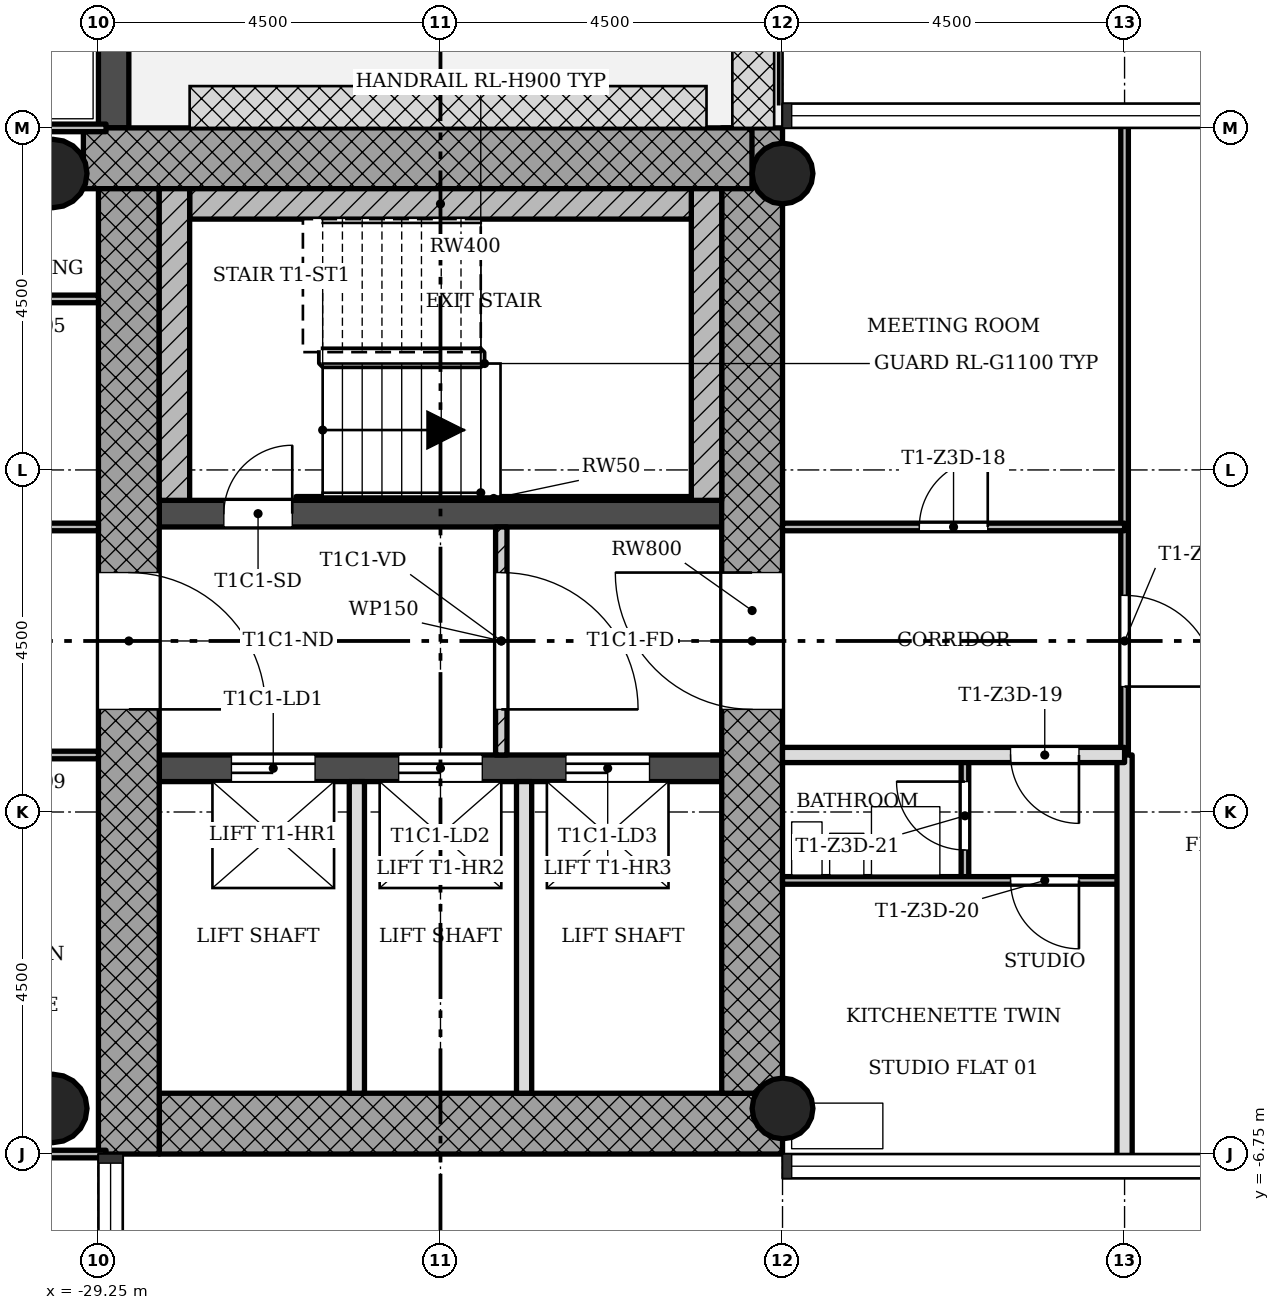
"""IFC4 building model, lengths in metres.
Left out: names, types, materials, properties, quantities, classifications, styles, units other than length and angle.
Written with IfcOpenShell. Run it as: python <this file> out.ifc"""

import sys

from ifc_helpers import new_model, si_unit, direction, frame, frame_2d, origin, origin_2d, place, context, subcontext, project, spatial, rectangle, hollow_circle, extrude, element, fill, save


model = new_model("IFC4")
c1 = context("Model", 3, precision=1e-05, world=origin(), true_north=direction((0.0, 1.0)))
c2 = subcontext(c1, "Body", "Model", "MODEL_VIEW")
j1 = project(units=[si_unit("LENGTHUNIT", "METRE"), si_unit("PLANEANGLEUNIT", "RADIAN")], contexts=[c1])
p1 = place(None, origin())
s1 = spatial("IfcSite", under=j1, at=p1, CompositionType="ELEMENT")
p2 = place(p1, origin())
s2 = spatial("IfcBuilding", under=s1, at=p2, CompositionType="ELEMENT")
p3 = place(p2, frame((0.0, 0.0, 174.5)))
s3 = spatial("IfcBuildingStorey", under=s2, at=p3, CompositionType="ELEMENT", Elevation=174.5)
p4 = place(p3, frame((-28.45, -6.35, 0.0), z_axis=(0.0, 0.0, 1.0), x_axis=(1.0, 0.0, 0.0)))
e1 = element("IfcWall", 1, at=p4, inside=s3, PredefinedType="SHEAR", context=c2, shape_type="SweptSolid", body=[
    extrude(rectangle(XDim=8.2, YDim=0.8, at=frame_2d((4.1, 0.0))), origin(), (0.0, 0.0, 1.0), 3.4),
])
p5 = place(p3, frame((-20.65, -5.95, 0.0), z_axis=(0.0, 0.0, 1.0), x_axis=(0.0, 1.0, 0.0)))
e2 = element("IfcWall", 2, at=p5, inside=s3, PredefinedType="SHEAR", context=c2, shape_type="SweptSolid", body=[
    extrude(rectangle(XDim=12.7, YDim=0.8, at=frame_2d((6.35, 0.0))), origin(), (0.0, 0.0, 1.0), 3.4),
])
p6 = place(p5, frame((5.05, 0.0, 0.0)))
e3 = element("IfcOpeningElement", 3, at=p6, cuts=e2, PredefinedType="OPENING", context=c2, shape_type="SweptSolid", body=[
    extrude(rectangle(XDim=1.8, YDim=2.1, at=frame_2d((0.9, 1.05))), frame((0.0, 0.41, 0.0), z_axis=(0.0, -1.0, 0.0), x_axis=(1.0, 0.0, 0.0)), (0.0, 0.0, 1.0), 0.82),
])
p7 = place(p3, frame((-20.652, 6.35, 0.0), z_axis=(0.0, 0.0, 1.0), x_axis=(-1.0, 0.0, 0.0)))
e4 = element("IfcWall", 4, at=p7, inside=s3, PredefinedType="SHEAR", context=c2, shape_type="SweptSolid", body=[
    extrude(rectangle(XDim=8.796, YDim=0.8, at=frame_2d((4.398, 0.0))), origin(), (0.0, 0.0, 1.0), 3.4),
])
p8 = place(p3, frame((-28.85, 5.95, 0.0), z_axis=(0.0, 0.0, 1.0), x_axis=(0.0, -1.0, 0.0)))
e5 = element("IfcWall", 5, at=p8, inside=s3, PredefinedType="SHEAR", context=c2, shape_type="SweptSolid", body=[
    extrude(rectangle(XDim=12.7, YDim=0.8, at=frame_2d((6.35, 0.0))), origin(), (0.0, 0.0, 1.0), 3.4),
])
p9 = place(p8, frame((5.05, 0.0, 0.0)))
e6 = element("IfcOpeningElement", 6, at=p9, cuts=e5, PredefinedType="OPENING", context=c2, shape_type="SweptSolid", body=[
    extrude(rectangle(XDim=1.8, YDim=2.1, at=frame_2d((0.9, 1.05))), frame((0.0, 0.41, 0.0), z_axis=(0.0, -1.0, 0.0), x_axis=(1.0, 0.0, 0.0)), (0.0, 0.0, 1.0), 0.82),
])
p10 = place(p3, frame((-28.45, -1.675, 0.0), z_axis=(0.0, 0.0, 1.0), x_axis=(1.0, 0.0, 0.0)))
e7 = element("IfcWall", 7, at=p10, inside=s3, PredefinedType="SHEAR", context=c2, shape_type="SweptSolid", body=[
    extrude(rectangle(XDim=7.4, YDim=0.35, at=frame_2d((3.7, 0.0))), origin(), (0.0, 0.0, 1.0), 3.4),
])
p11 = place(p10, frame((0.95, 0.0, 0.0)))
e8 = element("IfcOpeningElement", 8, at=p11, cuts=e7, PredefinedType="OPENING", context=c2, shape_type="SweptSolid", body=[
    extrude(rectangle(XDim=1.1, YDim=2.1, at=frame_2d((0.55, 1.05))), frame((0.0, 0.185, 0.0), z_axis=(0.0, -1.0, 0.0), x_axis=(1.0, 0.0, 0.0)), (0.0, 0.0, 1.0), 0.37),
])
p12 = place(p10, frame((3.15, 0.0, 0.0)))
e9 = element("IfcOpeningElement", 9, at=p12, cuts=e7, PredefinedType="OPENING", context=c2, shape_type="SweptSolid", body=[
    extrude(rectangle(XDim=1.1, YDim=2.1, at=frame_2d((0.55, 1.05))), frame((0.0, 0.185, 0.0), z_axis=(0.0, -1.0, 0.0), x_axis=(1.0, 0.0, 0.0)), (0.0, 0.0, 1.0), 0.37),
])
p13 = place(p10, frame((5.35, 0.0, 0.0)))
e10 = element("IfcOpeningElement", 10, at=p13, cuts=e7, PredefinedType="OPENING", context=c2, shape_type="SweptSolid", body=[
    extrude(rectangle(XDim=1.1, YDim=2.1, at=frame_2d((0.55, 1.05))), frame((0.0, 0.185, 0.0), z_axis=(0.0, -1.0, 0.0), x_axis=(1.0, 0.0, 0.0)), (0.0, 0.0, 1.0), 0.37),
])
p14 = place(p3, frame((-28.45, 1.675, 0.0), z_axis=(0.0, 0.0, 1.0), x_axis=(1.0, 0.0, 0.0)))
e11 = element("IfcWall", 11, at=p14, inside=s3, PredefinedType="SHEAR", context=c2, shape_type="SweptSolid", body=[
    extrude(rectangle(XDim=7.4, YDim=0.35, at=frame_2d((3.7, 0.0))), origin(), (0.0, 0.0, 1.0), 3.4),
])
p15 = place(p14, frame((0.85, 0.0, 0.0)))
e12 = element("IfcOpeningElement", 12, at=p15, cuts=e11, PredefinedType="OPENING", context=c2, shape_type="SweptSolid", body=[
    extrude(rectangle(XDim=0.9, YDim=2.1, at=frame_2d((0.45, 1.05))), frame((0.0, 0.185, 0.0), z_axis=(0.0, -1.0, 0.0), x_axis=(1.0, 0.0, 0.0)), (0.0, 0.0, 1.0), 0.37),
])
for number, where, z_axis, x_axis in (
    (13, (-20.25, -6.15, 0.0), (0.0, 0.0, 1.0), (1.0, 0.0, 0.0)),
    (14, (-20.25, 6.15, 0.0), (0.0, 0.0, 1.0), (1.0, 0.0, 0.0)),
):
    element("IfcColumn", number, at=place(p3, frame(where, z_axis=z_axis, x_axis=x_axis)), inside=s3, PredefinedType="COLUMN", context=c2, shape_type="SweptSolid", body=[
        extrude(hollow_circle(Radius=0.4, WallThickness=0.028, at=origin_2d()), origin(), (0.0, 0.0, 1.0), 3.4),
    ])
for number, where, z_axis, x_axis in (
    (15, (-29.85, -6.15, 0.0), (0.0, 0.0, 1.0), (1.0, 0.0, 0.0)),
    (16, (-29.85, 6.15, 0.0), (0.0, 0.0, 1.0), (1.0, 0.0, 0.0)),
):
    element("IfcColumn", number, at=place(p3, frame(where, z_axis=z_axis, x_axis=x_axis)), inside=s3, PredefinedType="COLUMN", context=c2, shape_type="SweptSolid", body=[
        extrude(hollow_circle(Radius=0.45, WallThickness=0.032, at=origin_2d()), origin(), (0.0, 0.0, 1.0), 3.4),
    ])
p16 = place(p3, frame((-29.05, 6.75, -0.02), z_axis=(0.0, 0.0, 1.0), x_axis=(0.0, 1.0, 0.0)))
e17 = element("IfcWall", 17, at=p16, inside=s3, PredefinedType="STANDARD", context=c2, shape_type="SweptSolid", body=[
    extrude(rectangle(XDim=4.5, YDim=0.4, at=frame_2d((2.25, 0.0))), origin(), (0.0, 0.0, 1.0), 3.12),
])
p17 = place(p16, frame((1.35, 0.0, 0.02)))
e18 = element("IfcOpeningElement", 18, at=p17, cuts=e17, PredefinedType="OPENING", context=c2, shape_type="SweptSolid", body=[
    extrude(rectangle(XDim=1.8, YDim=2.1, at=frame_2d((0.9, 1.05))), frame((0.0, 0.21, 0.0), z_axis=(0.0, -1.0, 0.0), x_axis=(1.0, 0.0, 0.0)), (0.0, 0.0, 1.0), 0.42),
])
p18 = place(p3, frame((-23.95, -1.5, 0.0), z_axis=(0.0, 0.0, 1.0), x_axis=(0.0, 1.0, 0.0)))
e19 = element("IfcWall", 19, at=p18, inside=s3, PredefinedType="PARTITIONING", context=c2, shape_type="SweptSolid", body=[
    extrude(rectangle(XDim=3.0, YDim=0.15, at=frame_2d((1.5, 0.0))), origin(), (0.0, 0.0, 1.0), 3.0),
])
p19 = place(p18, frame((0.6, 0.0, 0.0)))
e20 = element("IfcOpeningElement", 20, at=p19, cuts=e19, PredefinedType="OPENING", context=c2, shape_type="SweptSolid", body=[
    extrude(rectangle(XDim=1.8, YDim=2.1, at=frame_2d((0.9, 1.05))), frame((0.0, 0.085, 0.0), z_axis=(0.0, -1.0, 0.0), x_axis=(1.0, 0.0, 0.0)), (0.0, 0.0, 1.0), 0.17),
])
for number, where, z_axis, x_axis in (
    (21, (-25.85, -5.95, 0.0), (0.0, 0.0, 1.0), (0.0, 1.0, 0.0)),
    (22, (-23.65, -5.95, 0.0), (0.0, 0.0, 1.0), (0.0, 1.0, 0.0)),
):
    element("IfcWall", number, at=place(p3, frame(where, z_axis=z_axis, x_axis=x_axis)), inside=s3, PredefinedType="SOLIDWALL", context=c2, shape_type="SweptSolid", body=[
        extrude(rectangle(XDim=4.1, YDim=0.2, at=frame_2d((2.05, 0.0))), origin(), (0.0, 0.0, 1.0), 3.0),
    ])
p20 = place(p3, frame((-17.85, -3.15, 0.0), z_axis=(0.0, 0.0, 1.0), x_axis=(0.0, 1.0, 0.0)))
e23 = element("IfcWall", 23, at=p20, inside=s3, PredefinedType="PARTITIONING", context=c2, shape_type="SweptSolid", body=[
    extrude(rectangle(XDim=1.65, YDim=0.1, at=frame_2d((0.825, 0.0))), origin(), (0.0, 0.0, 1.0), 3.0),
])
p21 = place(p20, frame((0.4, 0.0, 0.0)))
e24 = element("IfcOpeningElement", 24, at=p21, cuts=e23, PredefinedType="OPENING", context=c2, shape_type="SweptSolid", body=[
    extrude(rectangle(XDim=0.9, YDim=2.1, at=frame_2d((0.45, 1.05))), frame((0.0, 0.06, 0.0), z_axis=(0.0, -1.0, 0.0), x_axis=(1.0, 0.0, 0.0)), (0.0, 0.0, 1.0), 0.12),
])
p22 = place(p3, frame((-15.75, -1.5, 0.0), z_axis=(0.0, 0.0, 1.0), x_axis=(0.0, 1.0, 0.0)))
e25 = element("IfcWall", 25, at=p22, inside=s3, PredefinedType="PARTITIONING", context=c2, shape_type="SweptSolid", body=[
    extrude(rectangle(XDim=8.35, YDim=0.1, at=frame_2d((4.175, 0.0))), origin(), (0.0, 0.0, 1.0), 3.0),
])
p23 = place(p22, frame((0.9, 0.0, 0.0)))
e26 = element("IfcOpeningElement", 26, at=p23, cuts=e25, PredefinedType="OPENING", context=c2, shape_type="SweptSolid", body=[
    extrude(rectangle(XDim=1.2, YDim=2.1, at=frame_2d((0.6, 1.05))), frame((0.0, 0.06, 0.0), z_axis=(0.0, -1.0, 0.0), x_axis=(1.0, 0.0, 0.0)), (0.0, 0.0, 1.0), 0.12),
])
p24 = place(p3, frame((-15.75, -6.85, 0.0), z_axis=(0.0, 0.0, 1.0), x_axis=(0.0, 1.0, 0.0)))
e27 = element("IfcWall", 27, at=p24, inside=s3, PredefinedType="SOLIDWALL", context=c2, shape_type="SweptSolid", body=[
    extrude(rectangle(XDim=5.35, YDim=0.2, at=frame_2d((2.675, 0.0))), origin(), (0.0, 0.0, 1.0), 3.0),
])
p25 = place(p3, frame((-35.1, -6.75, 0.0), z_axis=(0.0, 0.0, 1.0), x_axis=(1.0, 0.0, 0.0)))
e28 = element("IfcWall", 28, at=p25, inside=s3, PredefinedType="PARTITIONING", context=c2, shape_type="SweptSolid", body=[
    extrude(rectangle(XDim=5.95, YDim=0.1, at=frame_2d((2.975, 0.0))), origin(), (0.0, 0.0, 1.0), 3.0),
])
p26 = place(p3, frame((-20.25, -3.15, 0.0), z_axis=(0.0, 0.0, 1.0), x_axis=(1.0, 0.0, 0.0)))
e29 = element("IfcWall", 29, at=p26, inside=s3, PredefinedType="PARTITIONING", context=c2, shape_type="SweptSolid", body=[
    extrude(rectangle(XDim=4.5, YDim=0.1, at=frame_2d((2.25, 0.0))), origin(), (0.0, 0.0, 1.0), 3.0),
])
p27 = place(p26, frame((3.0, 0.0, 0.0)))
e30 = element("IfcOpeningElement", 30, at=p27, cuts=e29, PredefinedType="OPENING", context=c2, shape_type="SweptSolid", body=[
    extrude(rectangle(XDim=0.9, YDim=2.1, at=frame_2d((0.45, 1.05))), frame((0.0, 0.06, 0.0), z_axis=(0.0, -1.0, 0.0), x_axis=(1.0, 0.0, 0.0)), (0.0, 0.0, 1.0), 0.12),
])
p28 = place(p3, frame((-31.5, -1.5, 0.0), z_axis=(0.0, 0.0, 1.0), x_axis=(1.0, 0.0, 0.0)))
e31 = element("IfcWall", 31, at=p28, inside=s3, PredefinedType="PARTITIONING", context=c2, shape_type="SweptSolid", body=[
    extrude(rectangle(XDim=2.25, YDim=0.1, at=frame_2d((1.125, 0.0))), origin(), (0.0, 0.0, 1.0), 3.0),
])
p29 = place(p3, frame((-20.25, -1.5, 0.0), z_axis=(0.0, 0.0, 1.0), x_axis=(1.0, 0.0, 0.0)))
e32 = element("IfcWall", 32, at=p29, inside=s3, PredefinedType="SOLIDWALL", context=c2, shape_type="SweptSolid", body=[
    extrude(rectangle(XDim=4.5, YDim=0.2, at=frame_2d((2.25, 0.0))), origin(), (0.0, 0.0, 1.0), 3.0),
])
p30 = place(p29, frame((3.0, 0.0, 0.0)))
e33 = element("IfcOpeningElement", 33, at=p30, cuts=e32, PredefinedType="OPENING", context=c2, shape_type="SweptSolid", body=[
    extrude(rectangle(XDim=0.9, YDim=2.1, at=frame_2d((0.45, 1.05))), frame((0.0, 0.11, 0.0), z_axis=(0.0, -1.0, 0.0), x_axis=(1.0, 0.0, 0.0)), (0.0, 0.0, 1.0), 0.22),
])
p31 = place(p3, frame((-31.5, 1.5, 0.0), z_axis=(0.0, 0.0, 1.0), x_axis=(1.0, 0.0, 0.0)))
e34 = element("IfcWall", 34, at=p31, inside=s3, PredefinedType="PARTITIONING", context=c2, shape_type="SweptSolid", body=[
    extrude(rectangle(XDim=2.25, YDim=0.1, at=frame_2d((1.125, 0.0))), origin(), (0.0, 0.0, 1.0), 3.0),
])
p32 = place(p3, frame((-20.25, 1.5, 0.0), z_axis=(0.0, 0.0, 1.0), x_axis=(1.0, 0.0, 0.0)))
e35 = element("IfcWall", 35, at=p32, inside=s3, PredefinedType="PARTITIONING", context=c2, shape_type="SweptSolid", body=[
    extrude(rectangle(XDim=4.5, YDim=0.1, at=frame_2d((2.25, 0.0))), origin(), (0.0, 0.0, 1.0), 3.0),
])
p33 = place(p32, frame((1.8, 0.0, 0.0)))
e36 = element("IfcOpeningElement", 36, at=p33, cuts=e35, PredefinedType="OPENING", context=c2, shape_type="SweptSolid", body=[
    extrude(rectangle(XDim=0.9, YDim=2.1, at=frame_2d((0.45, 1.05))), frame((0.0, 0.06, 0.0), z_axis=(0.0, -1.0, 0.0), x_axis=(1.0, 0.0, 0.0)), (0.0, 0.0, 1.0), 0.12),
])
p34 = place(p3, frame((-35.1, 4.5, 0.0), z_axis=(0.0, 0.0, 1.0), x_axis=(1.0, 0.0, 0.0)))
e37 = element("IfcWall", 37, at=p34, inside=s3, PredefinedType="PARTITIONING", context=c2, shape_type="SweptSolid", body=[
    extrude(rectangle(XDim=5.85, YDim=0.1, at=frame_2d((2.925, 0.0))), origin(), (0.0, 0.0, 1.0), 3.0),
])
p35 = place(p34, frame((1.35, 0.0, 0.0)))
e38 = element("IfcOpeningElement", 38, at=p35, cuts=e37, PredefinedType="OPENING", context=c2, shape_type="SweptSolid", body=[
    extrude(rectangle(XDim=0.9, YDim=2.1, at=frame_2d((0.45, 1.05))), frame((0.0, 0.06, 0.0), z_axis=(0.0, -1.0, 0.0), x_axis=(1.0, 0.0, 0.0)), (0.0, 0.0, 1.0), 0.12),
])
p36 = place(p3, frame((-35.1, 6.75, 0.0), z_axis=(0.0, 0.0, 1.0), x_axis=(1.0, 0.0, 0.0)))
e39 = element("IfcWall", 39, at=p36, inside=s3, PredefinedType="PARTITIONING", context=c2, shape_type="SweptSolid", body=[
    extrude(rectangle(XDim=5.95, YDim=0.1, at=frame_2d((2.975, 0.0))), origin(), (0.0, 0.0, 1.0), 3.0),
])
p37 = place(p3, frame((-21.25, 1.85, 0.0), z_axis=(0.0, 0.0, 1.0), x_axis=(0.0, 1.0, 0.0)))
e40 = element("IfcWall", 40, at=p37, inside=s3, PredefinedType="SHEAR", context=c2, shape_type="SweptSolid", body=[
    extrude(rectangle(XDim=4.1, YDim=0.4, at=frame_2d((2.05, 0.0))), origin(), (0.0, 0.0, 1.0), 3.4),
])
p38 = place(p3, frame((-28.05, 5.75, 0.0), z_axis=(0.0, 0.0, 1.0), x_axis=(1.0, 0.0, 0.0)))
e41 = element("IfcWall", 41, at=p38, inside=s3, PredefinedType="SHEAR", context=c2, shape_type="SweptSolid", body=[
    extrude(rectangle(XDim=6.6, YDim=0.4, at=frame_2d((3.3, 0.0))), origin(), (0.0, 0.0, 1.0), 3.4),
])
p39 = place(p3, frame((-28.25, 1.85, 0.0), z_axis=(0.0, 0.0, 1.0), x_axis=(0.0, 1.0, 0.0)))
e42 = element("IfcWall", 42, at=p39, inside=s3, PredefinedType="SHEAR", context=c2, shape_type="SweptSolid", body=[
    extrude(rectangle(XDim=4.1, YDim=0.4, at=frame_2d((2.05, 0.0))), origin(), (0.0, 0.0, 1.0), 3.4),
])
p40 = place(p3, frame((-26.65, 1.875, 0.0), z_axis=(0.0, 0.0, 1.0), x_axis=(1.0, 0.0, 0.0)))
e43 = element("IfcWall", 43, at=p40, inside=s3, PredefinedType="SHEAR", context=c2, shape_type="SweptSolid", body=[
    extrude(rectangle(XDim=5.2, YDim=0.05, at=frame_2d((2.6, 0.0))), origin(), (0.0, 0.0, 1.0), 3.4),
])
p41 = place(p19, origin())
e44 = element("IfcDoor", 44, at=p41, inside=s3, OperationType="SINGLE_SWING_LEFT", PredefinedType="DOOR", context=c2, shape_type="SweptSolid", body=[
    extrude(rectangle(XDim=1.8, YDim=2.1, at=frame_2d((0.9, 1.05))), frame((0.0, 0.025, 0.0), z_axis=(0.0, -1.0, 0.0), x_axis=(1.0, 0.0, 0.0)), (0.0, 0.0, 1.0), 0.05),
])
fill(e20, e44)
p42 = place(p33, origin())
e45 = element("IfcDoor", 45, at=p42, inside=s3, OperationType="SINGLE_SWING_LEFT", PredefinedType="DOOR", context=c2, shape_type="SweptSolid", body=[
    extrude(rectangle(XDim=0.9, YDim=2.1, at=frame_2d((0.45, 1.05))), frame((0.0, 0.025, 0.0), z_axis=(0.0, -1.0, 0.0), x_axis=(1.0, 0.0, 0.0)), (0.0, 0.0, 1.0), 0.05),
])
fill(e36, e45)
p43 = place(p30, origin())
e46 = element("IfcDoor", 46, at=p43, inside=s3, OperationType="SINGLE_SWING_RIGHT", PredefinedType="DOOR", context=c2, shape_type="SweptSolid", body=[
    extrude(rectangle(XDim=0.9, YDim=2.1, at=frame_2d((0.45, 1.05))), frame((0.0, 0.025, 0.0), z_axis=(0.0, -1.0, 0.0), x_axis=(1.0, 0.0, 0.0)), (0.0, 0.0, 1.0), 0.05),
])
fill(e33, e46)
p44 = place(p27, origin())
e47 = element("IfcDoor", 47, at=p44, inside=s3, OperationType="SINGLE_SWING_RIGHT", PredefinedType="DOOR", context=c2, shape_type="SweptSolid", body=[
    extrude(rectangle(XDim=0.9, YDim=2.1, at=frame_2d((0.45, 1.05))), frame((0.0, 0.025, 0.0), z_axis=(0.0, -1.0, 0.0), x_axis=(1.0, 0.0, 0.0)), (0.0, 0.0, 1.0), 0.05),
])
fill(e30, e47)
p45 = place(p21, origin())
e48 = element("IfcDoor", 48, at=p45, inside=s3, OperationType="SINGLE_SWING_LEFT", PredefinedType="DOOR", context=c2, shape_type="SweptSolid", body=[
    extrude(rectangle(XDim=0.9, YDim=2.1, at=frame_2d((0.45, 1.05))), frame((0.0, 0.025, 0.0), z_axis=(0.0, -1.0, 0.0), x_axis=(1.0, 0.0, 0.0)), (0.0, 0.0, 1.0), 0.05),
])
fill(e24, e48)
p46 = place(p23, origin())
e49 = element("IfcDoor", 49, at=p46, inside=s3, OperationType="SINGLE_SWING_LEFT", PredefinedType="DOOR", context=c2, shape_type="SweptSolid", body=[
    extrude(rectangle(XDim=1.2, YDim=2.1, at=frame_2d((0.6, 1.05))), frame((0.0, 0.025, 0.0), z_axis=(0.0, -1.0, 0.0), x_axis=(1.0, 0.0, 0.0)), (0.0, 0.0, 1.0), 0.05),
])
fill(e26, e49)
p47 = place(p15, origin())
e50 = element("IfcDoor", 50, at=p47, inside=s3, OperationType="SINGLE_SWING_LEFT", PredefinedType="DOOR", context=c2, shape_type="SweptSolid", body=[
    extrude(rectangle(XDim=0.9, YDim=2.1, at=frame_2d((0.45, 1.05))), frame((0.0, 0.025, 0.0), z_axis=(0.0, -1.0, 0.0), x_axis=(1.0, 0.0, 0.0)), (0.0, 0.0, 1.0), 0.05),
])
fill(e12, e50)
p48 = place(p11, origin())
e51 = element("IfcDoor", 51, at=p48, inside=s3, OperationType="SLIDING_TO_LEFT", PredefinedType="DOOR", context=c2, shape_type="SweptSolid", body=[
    extrude(rectangle(XDim=1.1, YDim=2.1, at=frame_2d((0.55, 1.05))), frame((0.0, 0.025, 0.0), z_axis=(0.0, -1.0, 0.0), x_axis=(1.0, 0.0, 0.0)), (0.0, 0.0, 1.0), 0.05),
])
fill(e8, e51)
p49 = place(p12, origin())
e52 = element("IfcDoor", 52, at=p49, inside=s3, OperationType="SLIDING_TO_LEFT", PredefinedType="DOOR", context=c2, shape_type="SweptSolid", body=[
    extrude(rectangle(XDim=1.1, YDim=2.1, at=frame_2d((0.55, 1.05))), frame((0.0, 0.025, 0.0), z_axis=(0.0, -1.0, 0.0), x_axis=(1.0, 0.0, 0.0)), (0.0, 0.0, 1.0), 0.05),
])
fill(e9, e52)
p50 = place(p13, origin())
e53 = element("IfcDoor", 53, at=p50, inside=s3, OperationType="SLIDING_TO_LEFT", PredefinedType="DOOR", context=c2, shape_type="SweptSolid", body=[
    extrude(rectangle(XDim=1.1, YDim=2.1, at=frame_2d((0.55, 1.05))), frame((0.0, 0.025, 0.0), z_axis=(0.0, -1.0, 0.0), x_axis=(1.0, 0.0, 0.0)), (0.0, 0.0, 1.0), 0.05),
])
fill(e10, e53)
p51 = place(p9, origin())
e54 = element("IfcDoor", 54, at=p51, inside=s3, OperationType="SINGLE_SWING_LEFT", PredefinedType="DOOR", context=c2, shape_type="SweptSolid", body=[
    extrude(rectangle(XDim=1.8, YDim=2.1, at=frame_2d((0.9, 1.05))), frame((0.0, 0.025, 0.0), z_axis=(0.0, -1.0, 0.0), x_axis=(1.0, 0.0, 0.0)), (0.0, 0.0, 1.0), 0.05),
])
fill(e6, e54)
p52 = place(p6, origin())
e55 = element("IfcDoor", 55, at=p52, inside=s3, OperationType="SINGLE_SWING_LEFT", PredefinedType="DOOR", context=c2, shape_type="SweptSolid", body=[
    extrude(rectangle(XDim=1.8, YDim=2.1, at=frame_2d((0.9, 1.05))), frame((0.0, 0.025, 0.0), z_axis=(0.0, -1.0, 0.0), x_axis=(1.0, 0.0, 0.0)), (0.0, 0.0, 1.0), 0.05),
])
fill(e3, e55)
save(model, sys.argv[1])
